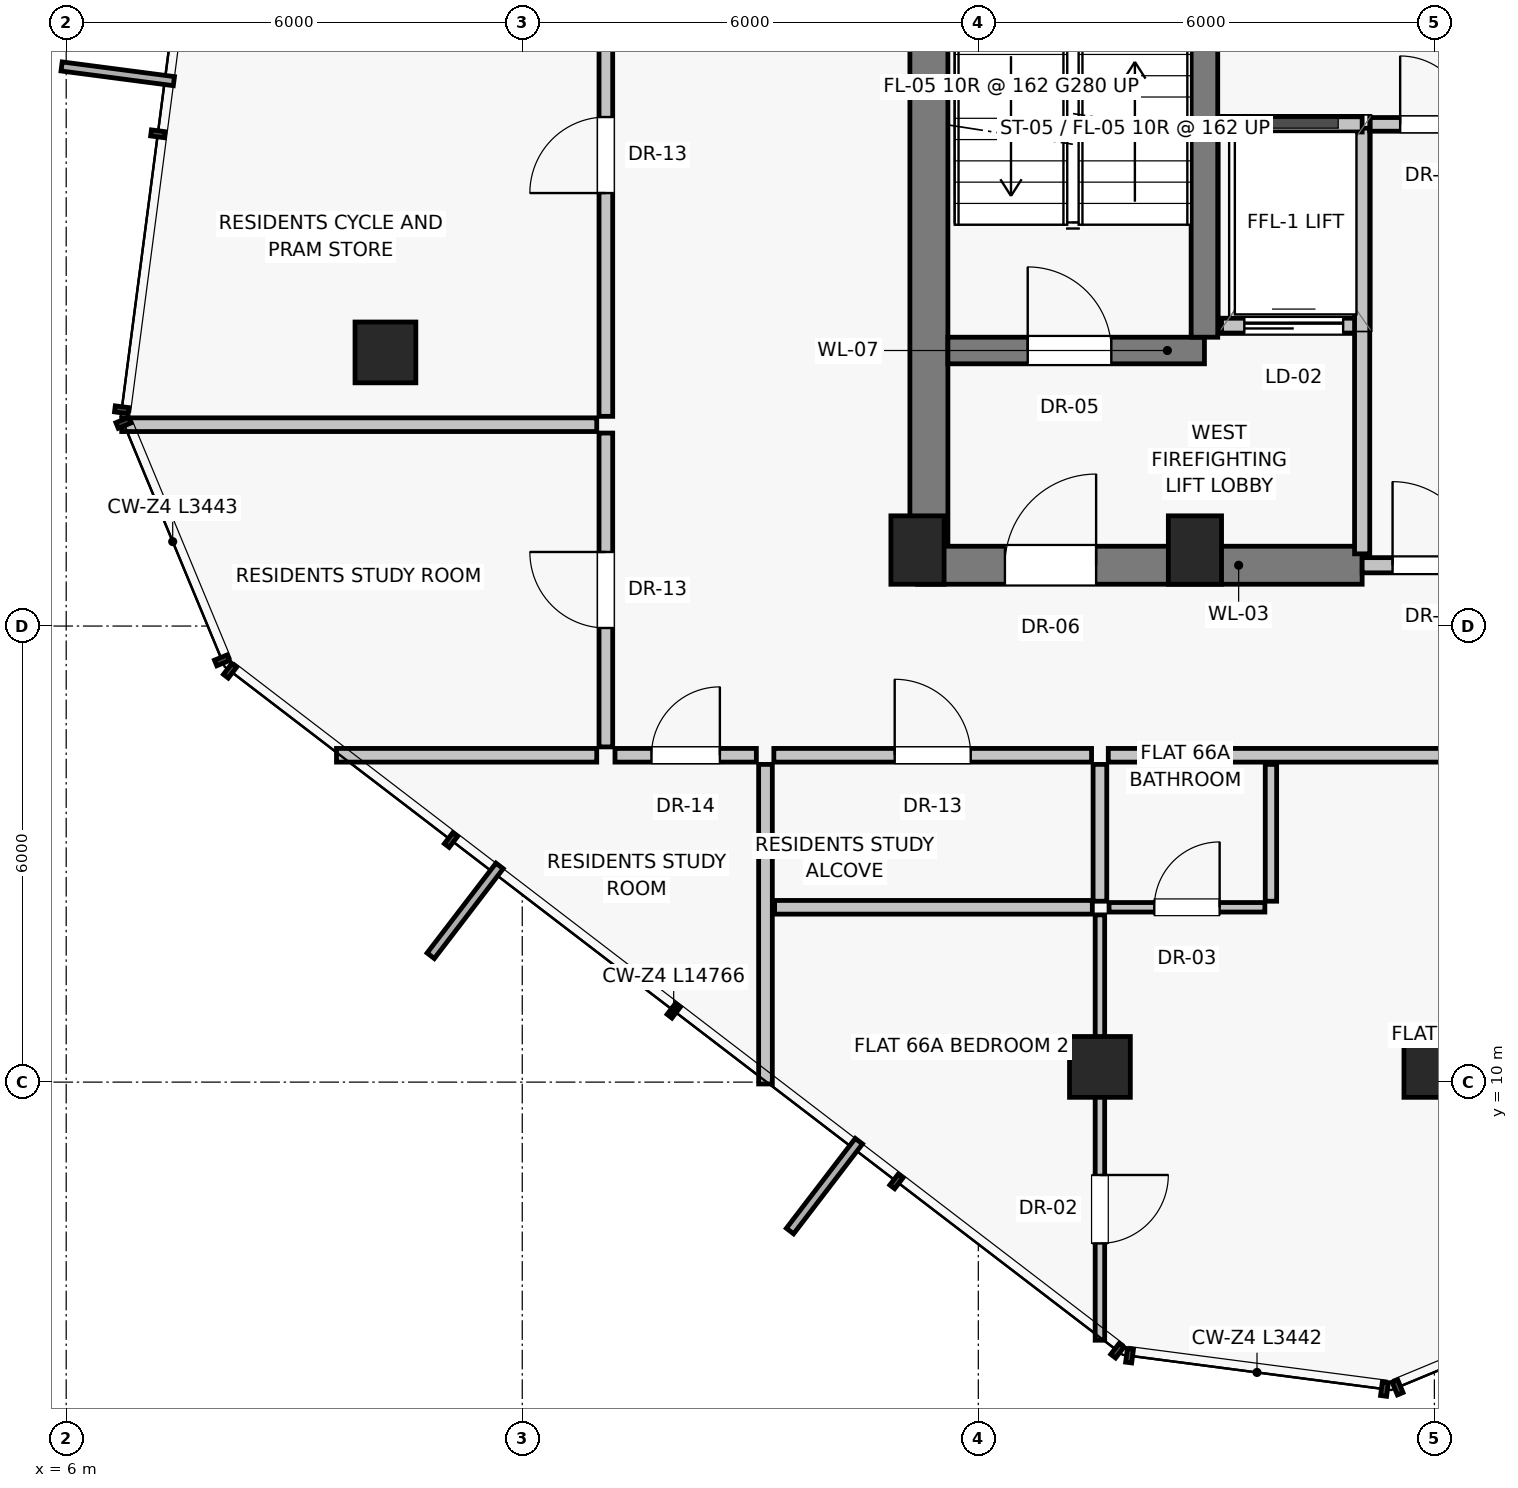
"""IFC4 building model, lengths in metres.
Left out: names, types, materials, properties, quantities, classifications, styles, units other than length and angle.
Written with IfcOpenShell. Run it as: python <this file> out.ifc"""

import sys

from ifc_helpers import new_model, si_unit, direction, frame, frame_2d, origin, origin_2d, place, context, subcontext, project, spatial, rectangle, extrude, source, transform, mapped, element, fill, save


model = new_model("IFC4")
c1 = context("Model", 3, precision=1e-05, world=origin(), true_north=direction((0.0, 1.0)))
c2 = subcontext(c1, "Body", "Model", "MODEL_VIEW")
j1 = project(units=[si_unit("LENGTHUNIT", "METRE"), si_unit("PLANEANGLEUNIT", "RADIAN")], contexts=[c1])
p1 = place(None, origin())
s1 = spatial("IfcSite", under=j1, at=p1, CompositionType="ELEMENT")
p2 = place(p1, origin())
s2 = spatial("IfcBuilding", under=s1, at=p2, CompositionType="ELEMENT")
p3 = place(p2, frame((0.0, 0.0, 233.3)))
s3 = spatial("IfcBuildingStorey", under=s2, at=p3, CompositionType="ELEMENT", Elevation=233.3)
for number, where, z_axis, x_axis in (
    (1, (17.2, 17.0, 0.0), (0.0, 0.0, 1.0), (1.0, 0.0, 0.0)),
    (2, (20.85, 17.0, 0.0), (0.0, 0.0, 1.0), (1.0, 0.0, 0.0)),
):
    element("IfcColumn", number, at=place(p3, frame(where, z_axis=z_axis, x_axis=x_axis)), inside=s3, PredefinedType="PILASTER", context=c2, shape_type="SweptSolid", body=[
        extrude(rectangle(XDim=0.7, YDim=0.9, at=origin_2d()), origin(), (0.0, 0.0, 1.0), 3.25),
    ])
for number, where, z_axis, x_axis in (
    (3, (10.2, 19.6, 0.0), (0.0, 0.0, 1.0), (1.0, 0.0, 0.0)),
    (4, (19.6, 10.2, 0.0), (0.0, 0.0, 1.0), (1.0, 0.0, 0.0)),
    (5, (24.0, 10.2, 0.0), (0.0, 0.0, 1.0), (1.0, 0.0, 0.0)),
):
    element("IfcColumn", number, at=place(p3, frame(where, z_axis=z_axis, x_axis=x_axis)), inside=s3, PredefinedType="COLUMN", context=c2, shape_type="SweptSolid", body=[
        extrude(rectangle(XDim=0.8, YDim=0.8, at=origin_2d()), origin(), (0.0, 0.0, 1.0), 3.25),
    ])
p4 = place(p3, frame((17.35, 16.8, 0.0), z_axis=(0.0, 0.0, 1.0), x_axis=(0.0, 1.0, 0.0)))
e6 = element("IfcWall", 6, at=p4, inside=s3, PredefinedType="SHEAR", context=c2, shape_type="SweptSolid", body=[
    extrude(rectangle(XDim=14.2, YDim=0.5, at=frame_2d((7.1, 0.0))), origin(), (0.0, 0.0, 1.0), 3.015),
])
p5 = place(p3, frame((17.2, 16.8, 0.0), z_axis=(0.0, 0.0, 1.0), x_axis=(1.0, 0.0, 0.0)))
e7 = element("IfcWall", 7, at=p5, inside=s3, PredefinedType="SHEAR", context=c2, shape_type="SweptSolid", body=[
    extrude(rectangle(XDim=5.85, YDim=0.5, at=frame_2d((2.925, 0.0))), origin(), (0.0, 0.0, 1.0), 3.015),
])
p6 = place(p5, frame((1.15, 0.0, 0.0)))
e8 = element("IfcOpeningElement", 8, at=p6, cuts=e7, PredefinedType="OPENING", context=c2, shape_type="SweptSolid", body=[
    extrude(rectangle(XDim=1.2, YDim=2.03, at=frame_2d((0.6, 1.015))), frame((0.0, 0.26, 0.0), z_axis=(0.0, -1.0, 0.0), x_axis=(1.0, 0.0, 0.0)), (0.0, 0.0, 1.0), 0.52),
])
p7 = place(p3, frame((23.05, 16.8, 0.0), z_axis=(0.0, 0.0, 1.0), x_axis=(1.0, 0.0, 0.0)))
e9 = element("IfcWall", 9, at=p7, inside=s3, PredefinedType="SOLIDWALL", context=c2, shape_type="SweptSolid", body=[
    extrude(rectangle(XDim=1.9, YDim=0.2, at=frame_2d((0.95, 0.0))), origin(), (0.0, 0.0, 1.0), 2.165),
])
p8 = place(p7, frame((0.4, 0.0, 0.0)))
e10 = element("IfcOpeningElement", 10, at=p8, cuts=e9, PredefinedType="OPENING", context=c2, shape_type="SweptSolid", body=[
    extrude(rectangle(XDim=1.1, YDim=2.03, at=frame_2d((0.55, 1.015))), frame((0.0, 0.11, 0.0), z_axis=(0.0, -1.0, 0.0), x_axis=(1.0, 0.0, 0.0)), (0.0, 0.0, 1.0), 0.22),
])
p9 = place(p3, frame((17.6, 19.625, 0.0), z_axis=(0.0, 0.0, 1.0), x_axis=(1.0, 0.0, 0.0)))
e11 = element("IfcWall", 11, at=p9, inside=s3, PredefinedType="SHEAR", context=c2, shape_type="SweptSolid", body=[
    extrude(rectangle(XDim=3.375, YDim=0.35, at=frame_2d((1.688, 0.0))), origin(), (0.0, 0.0, 1.0), 3.015),
])
p10 = place(p9, frame((1.05, 0.0, 0.0)))
e12 = element("IfcOpeningElement", 12, at=p10, cuts=e11, PredefinedType="OPENING", context=c2, shape_type="SweptSolid", body=[
    extrude(rectangle(XDim=1.1, YDim=2.03, at=frame_2d((0.55, 1.015))), frame((0.0, 0.185, 0.0), z_axis=(0.0, -1.0, 0.0), x_axis=(1.0, 0.0, 0.0)), (0.0, 0.0, 1.0), 0.37),
])
p11 = place(p3, frame((21.2, 19.95, 0.0), z_axis=(0.0, 0.0, 1.0), x_axis=(1.0, 0.0, 0.0)))
e13 = element("IfcWall", 13, at=p11, inside=s3, PredefinedType="SOLIDWALL", context=c2, shape_type="SweptSolid", body=[
    extrude(rectangle(XDim=1.85, YDim=0.2, at=frame_2d((0.925, 0.0))), origin(), (0.0, 0.0, 1.0), 3.015),
])
p12 = place(p11, frame((0.3, 0.0, 0.0)))
e14 = element("IfcOpeningElement", 14, at=p12, cuts=e13, PredefinedType="OPENING", context=c2, shape_type="SweptSolid", body=[
    extrude(rectangle(XDim=1.3, YDim=2.25, at=frame_2d((0.65, 1.125))), frame((0.0, 0.11, 0.0), z_axis=(0.0, -1.0, 0.0), x_axis=(1.0, 0.0, 0.0)), (0.0, 0.0, 1.0), 0.22),
])
p13 = place(p3, frame((20.975, 19.8, 0.0), z_axis=(0.0, 0.0, 1.0), x_axis=(0.0, 1.0, 0.0)))
e15 = element("IfcWall", 15, at=p13, inside=s3, PredefinedType="SHEAR", context=c2, shape_type="SweptSolid", body=[
    extrude(rectangle(XDim=8.775, YDim=0.35, at=frame_2d((4.387, 0.0))), origin(), (0.0, 0.0, 1.0), 3.015),
])
p14 = place(p3, frame((23.05, 16.95, 0.0), z_axis=(0.0, 0.0, 1.0), x_axis=(0.0, 1.0, 0.0)))
e16 = element("IfcWall", 16, at=p14, inside=s3, PredefinedType="SOLIDWALL", context=c2, shape_type="SweptSolid", body=[
    extrude(rectangle(XDim=5.6, YDim=0.2, at=frame_2d((2.8, 0.0))), origin(), (0.0, 0.0, 1.0), 3.015),
])
p15 = place(p3, frame((21.2, 22.6, 0.0), z_axis=(0.0, 0.0, 1.0), x_axis=(1.0, 0.0, 0.0)))
e17 = element("IfcWall", 17, at=p15, inside=s3, PredefinedType="SOLIDWALL", context=c2, shape_type="SweptSolid", body=[
    extrude(rectangle(XDim=1.85, YDim=0.2, at=frame_2d((0.925, 0.0))), origin(), (0.0, 0.0, 1.0), 3.015),
])
p16 = place(p3, frame((23.15, 22.6, 0.0), z_axis=(0.0, 0.0, 1.0), x_axis=(1.0, 0.0, 0.0)))
e18 = element("IfcWall", 18, at=p16, inside=s3, PredefinedType="PARTITIONING", context=c2, shape_type="SweptSolid", body=[
    extrude(rectangle(XDim=1.7, YDim=0.18, at=frame_2d((0.85, 0.0))), origin(), (0.0, 0.0, 1.0), 3.015),
])
p17 = place(p16, frame((0.4, 0.0, 0.0)))
e19 = element("IfcOpeningElement", 19, at=p17, cuts=e18, PredefinedType="OPENING", context=c2, shape_type="SweptSolid", body=[
    extrude(rectangle(XDim=0.9, YDim=2.01, at=frame_2d((0.45, 1.005))), frame((0.0, 0.1, 0.0), z_axis=(0.0, -1.0, 0.0), x_axis=(1.0, 0.0, 0.0)), (0.0, 0.0, 1.0), 0.2),
])
p18 = place(p3, frame((15.2, 14.18, 0.0), z_axis=(0.0, 0.0, 1.0), x_axis=(0.0, -1.0, 0.0)))
e20 = element("IfcWall", 20, at=p18, inside=s3, PredefinedType="PARTITIONING", context=c2, shape_type="SweptSolid", body=[
    extrude(rectangle(XDim=4.204, YDim=0.18, at=frame_2d((2.102, 0.0))), origin(), (0.0, 0.0, 1.0), 3.015),
])
p19 = place(p3, frame((15.31, 14.3, 0.0), z_axis=(0.0, 0.0, 1.0), x_axis=(1.0, 0.0, 0.0)))
e21 = element("IfcWall", 21, at=p19, inside=s3, PredefinedType="PARTITIONING", context=c2, shape_type="SweptSolid", body=[
    extrude(rectangle(XDim=4.18, YDim=0.18, at=frame_2d((2.09, 0.0))), origin(), (0.0, 0.0, 1.0), 3.015),
])
p20 = place(p19, frame((1.59, 0.0, 0.0)))
e22 = element("IfcOpeningElement", 22, at=p20, cuts=e21, PredefinedType="OPENING", context=c2, shape_type="SweptSolid", body=[
    extrude(rectangle(XDim=1.0, YDim=2.01, at=frame_2d((0.5, 1.005))), frame((0.0, 0.1, 0.0), z_axis=(0.0, -1.0, 0.0), x_axis=(1.0, 0.0, 0.0)), (0.0, 0.0, 1.0), 0.2),
])
p21 = place(p3, frame((19.71, 14.3, 0.0), z_axis=(0.0, 0.0, 1.0), x_axis=(1.0, 0.0, 0.0)))
e23 = element("IfcWall", 23, at=p21, inside=s3, PredefinedType="PARTITIONING", context=c2, shape_type="SweptSolid", body=[
    extrude(rectangle(XDim=11.38, YDim=0.18, at=frame_2d((5.69, 0.0))), origin(), (0.0, 0.0, 1.0), 3.015),
])
p22 = place(p21, frame((4.94, 0.0, 0.0)))
e24 = element("IfcOpeningElement", 24, at=p22, cuts=e23, PredefinedType="OPENING", context=c2, shape_type="SweptSolid", body=[
    extrude(rectangle(XDim=0.95, YDim=2.02, at=frame_2d((0.475, 1.01))), frame((0.0, 0.1, 0.0), z_axis=(0.0, -1.0, 0.0), x_axis=(1.0, 0.0, 0.0)), (0.0, 0.0, 1.0), 0.2),
])
p23 = place(p3, frame((15.32, 12.3, 0.0), z_axis=(0.0, 0.0, 1.0), x_axis=(1.0, 0.0, 0.0)))
e25 = element("IfcWall", 25, at=p23, inside=s3, PredefinedType="PARTITIONING", context=c2, shape_type="SweptSolid", body=[
    extrude(rectangle(XDim=4.18, YDim=0.18, at=frame_2d((2.09, 0.0))), origin(), (0.0, 0.0, 1.0), 3.015),
])
p24 = place(p3, frame((19.6, 14.18, 0.0), z_axis=(0.0, 0.0, 1.0), x_axis=(0.0, -1.0, 0.0)))
e26 = element("IfcWall", 26, at=p24, inside=s3, PredefinedType="PARTITIONING", context=c2, shape_type="SweptSolid", body=[
    extrude(rectangle(XDim=1.8, YDim=0.18, at=frame_2d((0.9, 0.0))), origin(), (0.0, 0.0, 1.0), 2.543),
])
p25 = place(p3, frame((19.6, 12.2, 0.0), z_axis=(0.0, 0.0, 1.0), x_axis=(0.0, -1.0, 0.0)))
e27 = element("IfcWall", 27, at=p25, inside=s3, PredefinedType="PARTITIONING", context=c2, shape_type="SweptSolid", body=[
    extrude(rectangle(XDim=5.596, YDim=0.125, at=frame_2d((2.798, 0.0))), origin(), (0.0, 0.0, 1.0), 2.543),
])
p26 = place(p25, frame((3.422, 0.0, 0.0)))
e28 = element("IfcOpeningElement", 28, at=p26, cuts=e27, PredefinedType="OPENING", context=c2, shape_type="SweptSolid", body=[
    extrude(rectangle(XDim=0.9, YDim=2.01, at=frame_2d((0.45, 1.005))), frame((0.0, 0.073, 0.0), z_axis=(0.0, -1.0, 0.0), x_axis=(1.0, 0.0, 0.0)), (0.0, 0.0, 1.0), 0.145),
])
p27 = place(p3, frame((21.85, 14.18, 0.0), z_axis=(0.0, 0.0, 1.0), x_axis=(0.0, -1.0, 0.0)))
e29 = element("IfcWall", 29, at=p27, inside=s3, PredefinedType="PARTITIONING", context=c2, shape_type="SweptSolid", body=[
    extrude(rectangle(XDim=1.8, YDim=0.15, at=frame_2d((0.9, 0.0))), origin(), (0.0, 0.0, 1.0), 3.015),
])
p28 = place(p3, frame((19.72, 12.3, 0.0), z_axis=(0.0, 0.0, 1.0), x_axis=(1.0, 0.0, 0.0)))
e30 = element("IfcWall", 30, at=p28, inside=s3, PredefinedType="PARTITIONING", context=c2, shape_type="SweptSolid", body=[
    extrude(rectangle(XDim=2.05, YDim=0.125, at=frame_2d((1.025, 0.0))), origin(), (0.0, 0.0, 1.0), 3.015),
])
p29 = place(p28, frame((0.595, 0.0, 0.0)))
e31 = element("IfcOpeningElement", 31, at=p29, cuts=e30, PredefinedType="OPENING", context=c2, shape_type="SweptSolid", body=[
    extrude(rectangle(XDim=0.86, YDim=2.01, at=frame_2d((0.43, 1.005))), frame((0.0, 0.073, 0.0), z_axis=(0.0, -1.0, 0.0), x_axis=(1.0, 0.0, 0.0)), (0.0, 0.0, 1.0), 0.145),
])
p30 = place(p3, frame((12.98, 14.3, 0.0), z_axis=(0.0, 0.0, 1.0), x_axis=(-1.0, 0.0, 0.0)))
e32 = element("IfcWall", 32, at=p30, inside=s3, PredefinedType="PARTITIONING", context=c2, shape_type="SweptSolid", body=[
    extrude(rectangle(XDim=3.424, YDim=0.18, at=frame_2d((1.712, 0.0))), origin(), (0.0, 0.0, 1.0), 3.015),
])
p31 = place(p3, frame((13.1, 14.41, 0.0), z_axis=(0.0, 0.0, 1.0), x_axis=(0.0, 1.0, 0.0)))
e33 = element("IfcWall", 33, at=p31, inside=s3, PredefinedType="PARTITIONING", context=c2, shape_type="SweptSolid", body=[
    extrude(rectangle(XDim=4.129, YDim=0.18, at=frame_2d((2.064, 0.0))), origin(), (0.0, 0.0, 1.0), 2.662),
])
p32 = place(p31, frame((1.564, 0.0, 0.0)))
e34 = element("IfcOpeningElement", 34, at=p32, cuts=e33, PredefinedType="OPENING", context=c2, shape_type="SweptSolid", body=[
    extrude(rectangle(XDim=1.0, YDim=2.01, at=frame_2d((0.5, 1.005))), frame((0.0, 0.1, 0.0), z_axis=(0.0, -1.0, 0.0), x_axis=(1.0, 0.0, 0.0)), (0.0, 0.0, 1.0), 0.2),
])
p33 = place(p3, frame((13.1, 18.759, 0.0), z_axis=(0.0, 0.0, 1.0), x_axis=(0.0, 1.0, 0.0)))
e35 = element("IfcWall", 35, at=p33, inside=s3, PredefinedType="PARTITIONING", context=c2, shape_type="SweptSolid", body=[
    extrude(rectangle(XDim=6.875, YDim=0.18, at=frame_2d((3.438, 0.0))), origin(), (0.0, 0.0, 1.0), 2.662),
])
p34 = place(p33, frame((2.938, 0.0, 0.0)))
e36 = element("IfcOpeningElement", 36, at=p34, cuts=e35, PredefinedType="OPENING", context=c2, shape_type="SweptSolid", body=[
    extrude(rectangle(XDim=1.0, YDim=2.01, at=frame_2d((0.5, 1.005))), frame((0.0, 0.1, 0.0), z_axis=(0.0, -1.0, 0.0), x_axis=(1.0, 0.0, 0.0)), (0.0, 0.0, 1.0), 0.2),
])
p35 = place(p3, frame((12.98, 18.649, 0.0), z_axis=(0.0, 0.0, 1.0), x_axis=(-1.0, 0.0, 0.0)))
e37 = element("IfcWall", 37, at=p35, inside=s3, PredefinedType="PARTITIONING", context=c2, shape_type="SweptSolid", body=[
    extrude(rectangle(XDim=6.25, YDim=0.18, at=frame_2d((3.125, 0.0))), origin(), (0.0, 0.0, 1.0), 3.015),
])
p36 = place(p3, frame((13.22, 14.3, 0.0), z_axis=(0.0, 0.0, 1.0), x_axis=(1.0, 0.0, 0.0)))
e38 = element("IfcWall", 38, at=p36, inside=s3, PredefinedType="PARTITIONING", context=c2, shape_type="SweptSolid", body=[
    extrude(rectangle(XDim=1.86, YDim=0.18, at=frame_2d((0.93, 0.0))), origin(), (0.0, 0.0, 1.0), 3.015),
])
p37 = place(p36, frame((0.48, 0.0, 0.0)))
e39 = element("IfcOpeningElement", 39, at=p37, cuts=e38, PredefinedType="OPENING", context=c2, shape_type="SweptSolid", body=[
    extrude(rectangle(XDim=0.9, YDim=2.01, at=frame_2d((0.45, 1.005))), frame((0.0, 0.1, 0.0), z_axis=(0.0, -1.0, 0.0), x_axis=(1.0, 0.0, 0.0)), (0.0, 0.0, 1.0), 0.2),
])
m1 = source(origin(), c2, "Body", "SweptSolid", [
    extrude(rectangle(XDim=1.2, YDim=2.03, at=frame_2d((0.6, 1.015))), frame((0.0, 0.025, 0.0), z_axis=(0.0, -1.0, 0.0), x_axis=(1.0, 0.0, 0.0)), (0.0, 0.0, 1.0), 0.05),
])
p38 = place(p6, origin())
e40 = element("IfcDoor", 40, at=p38, inside=s3, OperationType="SINGLE_SWING_RIGHT", PredefinedType="DOOR", context=c2, shape_type="MappedRepresentation", body=[
    mapped(m1, transform((0.0, 0.0, 0.0), scale=1.0)),
])
fill(e8, e40)
m2 = source(origin(), c2, "Body", "SweptSolid", [
    extrude(rectangle(XDim=1.1, YDim=2.03, at=frame_2d((0.55, 1.015))), frame((0.0, 0.025, 0.0), z_axis=(0.0, -1.0, 0.0), x_axis=(1.0, 0.0, 0.0)), (0.0, 0.0, 1.0), 0.05),
])
p39 = place(p8, origin())
e41 = element("IfcDoor", 41, at=p39, inside=s3, OperationType="SINGLE_SWING_LEFT", PredefinedType="DOOR", context=c2, shape_type="MappedRepresentation", body=[
    mapped(m2, transform((0.0, 0.0, 0.0), scale=1.0)),
])
fill(e10, e41)
p40 = place(p10, origin())
e42 = element("IfcDoor", 42, at=p40, inside=s3, OperationType="SINGLE_SWING_LEFT", PredefinedType="DOOR", context=c2, shape_type="MappedRepresentation", body=[
    mapped(m2, transform((0.0, 0.0, 0.0), scale=1.0)),
])
fill(e12, e42)
m3 = source(origin(), c2, "Body", "SweptSolid", [
    extrude(rectangle(XDim=1.3, YDim=2.25, at=frame_2d((0.65, 1.125))), frame((0.0, 0.025, 0.0), z_axis=(0.0, -1.0, 0.0), x_axis=(1.0, 0.0, 0.0)), (0.0, 0.0, 1.0), 0.05),
])
p41 = place(p12, origin())
e43 = element("IfcDoor", 43, at=p41, inside=s3, OperationType="SLIDING_TO_LEFT", PredefinedType="DOOR", context=c2, shape_type="MappedRepresentation", body=[
    mapped(m3, transform((0.0, 0.0, 0.0), scale=1.0)),
])
fill(e14, e43)
m4 = source(origin(), c2, "Body", "SweptSolid", [
    extrude(rectangle(XDim=0.9, YDim=2.01, at=frame_2d((0.45, 1.005))), frame((0.0, 0.025, 0.0), z_axis=(0.0, -1.0, 0.0), x_axis=(1.0, 0.0, 0.0)), (0.0, 0.0, 1.0), 0.05),
])
p42 = place(p17, origin())
e44 = element("IfcDoor", 44, at=p42, inside=s3, OperationType="SINGLE_SWING_LEFT", PredefinedType="DOOR", context=c2, shape_type="MappedRepresentation", body=[
    mapped(m4, transform((0.0, 0.0, 0.0), scale=1.0)),
])
fill(e19, e44)
m5 = source(origin(), c2, "Body", "SweptSolid", [
    extrude(rectangle(XDim=1.0, YDim=2.01, at=frame_2d((0.5, 1.005))), frame((0.0, 0.025, 0.0), z_axis=(0.0, -1.0, 0.0), x_axis=(1.0, 0.0, 0.0)), (0.0, 0.0, 1.0), 0.05),
])
p43 = place(p20, origin())
e45 = element("IfcDoor", 45, at=p43, inside=s3, OperationType="SINGLE_SWING_LEFT", PredefinedType="DOOR", context=c2, shape_type="MappedRepresentation", body=[
    mapped(m5, transform((0.0, 0.0, 0.0), scale=1.0)),
])
fill(e22, e45)
p44 = place(p26, origin())
e46 = element("IfcDoor", 46, at=p44, inside=s3, OperationType="SINGLE_SWING_LEFT", PredefinedType="DOOR", context=c2, shape_type="MappedRepresentation", body=[
    mapped(m4, transform((0.0, 0.0, 0.0), scale=1.0)),
])
fill(e28, e46)
m6 = source(origin(), c2, "Body", "SweptSolid", [
    extrude(rectangle(XDim=0.86, YDim=2.01, at=frame_2d((0.43, 1.005))), frame((0.0, 0.025, 0.0), z_axis=(0.0, -1.0, 0.0), x_axis=(1.0, 0.0, 0.0)), (0.0, 0.0, 1.0), 0.05),
])
p45 = place(p29, origin())
e47 = element("IfcDoor", 47, at=p45, inside=s3, OperationType="SINGLE_SWING_RIGHT", PredefinedType="DOOR", context=c2, shape_type="MappedRepresentation", body=[
    mapped(m6, transform((0.0, 0.0, 0.0), scale=1.0)),
])
fill(e31, e47)
p46 = place(p32, origin())
e48 = element("IfcDoor", 48, at=p46, inside=s3, OperationType="SINGLE_SWING_RIGHT", PredefinedType="DOOR", context=c2, shape_type="MappedRepresentation", body=[
    mapped(m5, transform((0.0, 0.0, 0.0), scale=1.0)),
])
fill(e34, e48)
p47 = place(p34, origin())
e49 = element("IfcDoor", 49, at=p47, inside=s3, OperationType="SINGLE_SWING_LEFT", PredefinedType="DOOR", context=c2, shape_type="MappedRepresentation", body=[
    mapped(m5, transform((0.0, 0.0, 0.0), scale=1.0)),
])
fill(e36, e49)
p48 = place(p37, origin())
e50 = element("IfcDoor", 50, at=p48, inside=s3, OperationType="SINGLE_SWING_RIGHT", PredefinedType="DOOR", context=c2, shape_type="MappedRepresentation", body=[
    mapped(m4, transform((0.0, 0.0, 0.0), scale=1.0)),
])
fill(e39, e50)
save(model, sys.argv[1])
